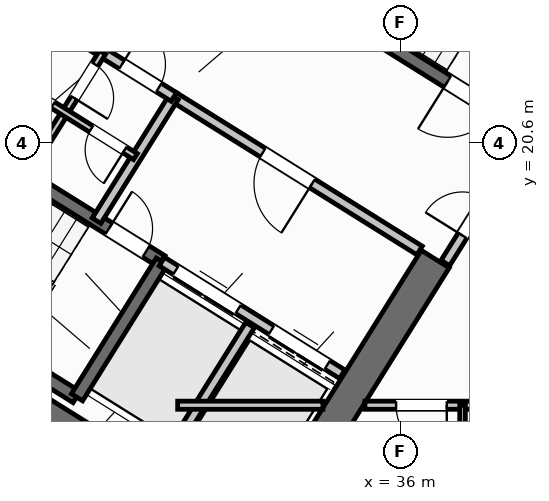
"""IFC4 building model, lengths in metres.
Left out: names, types, materials, properties, quantities, classifications, styles, units other than length and angle.
Written with IfcOpenShell. Run it as: python <this file> out.ifc"""

import sys

from ifc_helpers import new_model, si_unit, direction, frame, frame_2d, origin, place, context, subcontext, project, spatial, rectangle, extrude, source, transform, mapped, element, fill, save


model = new_model("IFC4")
c1 = context("Model", 3, precision=1e-05, world=origin(), true_north=direction((0.0, 1.0)))
c2 = subcontext(c1, "Body", "Model", "MODEL_VIEW")
j1 = project(units=[si_unit("LENGTHUNIT", "METRE"), si_unit("PLANEANGLEUNIT", "RADIAN")], contexts=[c1])
p1 = place(None, origin())
s1 = spatial("IfcSite", under=j1, at=p1, CompositionType="ELEMENT")
p2 = place(p1, origin())
s2 = spatial("IfcBuilding", under=s1, at=p2, CompositionType="ELEMENT")
p3 = place(p2, frame((0.0, 0.0, 93.6)))
s3 = spatial("IfcBuildingStorey", under=s2, at=p3, CompositionType="ELEMENT", Elevation=93.6)
p4 = place(p3, frame((33.409, 12.45, 0.0), z_axis=(0.0, 0.0, 1.0), x_axis=(-0.848051132073, 0.529914405721, 0.0)))
e1 = element("IfcWall", 1, at=p4, inside=s3, PredefinedType="SHEAR", context=c2, shape_type="SweptSolid", body=[
    extrude(rectangle(XDim=13.24, YDim=0.65, at=frame_2d((6.62, 0.0))), origin(), (0.0, 0.0, 1.0), 3.35),
])
p5 = place(p3, frame((36.683, 18.304, 0.0), z_axis=(0.0, 0.0, 1.0), x_axis=(-0.529899109053, -0.848060690178, 0.0)))
e2 = element("IfcWall", 2, at=p5, inside=s3, PredefinedType="SHEAR", context=c2, shape_type="SweptSolid", body=[
    extrude(rectangle(XDim=6.375, YDim=0.65, at=frame_2d((3.188, 0.0))), origin(), (0.0, 0.0, 1.0), 3.35),
])
p6 = place(p3, frame((31.76, 12.183, 0.0), z_axis=(0.0, 0.0, 1.0), x_axis=(-0.848047074256, 0.529920899612, 0.0)))
e3 = element("IfcWall", 3, at=p6, inside=s3, PredefinedType="STANDARD", context=c2, shape_type="SweptSolid", body=[
    extrude(rectangle(XDim=30.652, YDim=0.32, at=frame_2d((15.326, 0.0))), origin(), (0.0, 0.0, 1.0), 3.35),
])
p7 = place(p6, frame((15.153, 0.0, 0.0)))
e4 = element("IfcOpeningElement", 4, at=p7, cuts=e3, PredefinedType="OPENING", context=c2, shape_type="SweptSolid", body=[
    extrude(rectangle(XDim=1.2, YDim=2.15, at=frame_2d((0.6, 1.075))), frame((0.0, 0.17, 0.0), z_axis=(0.0, -1.0, 0.0), x_axis=(1.0, 0.0, 0.0)), (0.0, 0.0, 1.0), 0.34),
])
p8 = place(p6, frame((2.002, 0.0, 0.8)))
e5 = element("IfcOpeningElement", 5, at=p8, cuts=e3, PredefinedType="OPENING", context=c2, shape_type="SweptSolid", body=[
    extrude(rectangle(XDim=2.1, YDim=1.55, at=frame_2d((1.05, 0.775))), frame((0.0, 0.17, 0.0), z_axis=(0.0, -1.0, 0.0), x_axis=(1.0, 0.0, 0.0)), (0.0, 0.0, 1.0), 0.34),
])
p9 = place(p6, frame((7.206, 0.0, 0.8)))
e6 = element("IfcOpeningElement", 6, at=p9, cuts=e3, PredefinedType="OPENING", context=c2, shape_type="SweptSolid", body=[
    extrude(rectangle(XDim=2.1, YDim=1.55, at=frame_2d((1.05, 0.775))), frame((0.0, 0.17, 0.0), z_axis=(0.0, -1.0, 0.0), x_axis=(1.0, 0.0, 0.0)), (0.0, 0.0, 1.0), 0.34),
])
p10 = place(p6, frame((12.648, 0.0, 1.0)))
e7 = element("IfcOpeningElement", 7, at=p10, cuts=e3, PredefinedType="OPENING", context=c2, shape_type="SweptSolid", body=[
    extrude(rectangle(XDim=0.9, YDim=1.25, at=frame_2d((0.45, 0.625))), frame((0.0, 0.17, 0.0), z_axis=(0.0, -1.0, 0.0), x_axis=(1.0, 0.0, 0.0)), (0.0, 0.0, 1.0), 0.34),
])
p11 = place(p6, frame((27.974, 0.0, 0.95)))
e8 = element("IfcOpeningElement", 8, at=p11, cuts=e3, PredefinedType="OPENING", context=c2, shape_type="SweptSolid", body=[
    extrude(rectangle(XDim=1.2, YDim=1.4, at=frame_2d((0.6, 0.7))), frame((0.0, 0.17, 0.0), z_axis=(0.0, -1.0, 0.0), x_axis=(1.0, 0.0, 0.0)), (0.0, 0.0, 1.0), 0.34),
])
p12 = place(p6, frame((18.347, 0.0, 1.0)))
e9 = element("IfcOpeningElement", 9, at=p12, cuts=e3, PredefinedType="OPENING", context=c2, shape_type="SweptSolid", body=[
    extrude(rectangle(XDim=0.9, YDim=1.25, at=frame_2d((0.45, 0.625))), frame((0.0, 0.17, 0.0), z_axis=(0.0, -1.0, 0.0), x_axis=(1.0, 0.0, 0.0)), (0.0, 0.0, 1.0), 0.34),
])
p13 = place(p6, frame((20.931, 0.0, 1.0)))
e10 = element("IfcOpeningElement", 10, at=p13, cuts=e3, PredefinedType="OPENING", context=c2, shape_type="SweptSolid", body=[
    extrude(rectangle(XDim=0.65, YDim=1.15, at=frame_2d((0.325, 0.575))), frame((0.0, 0.17, 0.0), z_axis=(0.0, -1.0, 0.0), x_axis=(1.0, 0.0, 0.0)), (0.0, 0.0, 1.0), 0.34),
])
p14 = place(p6, frame((22.938, 0.0, 1.0)))
e11 = element("IfcOpeningElement", 11, at=p14, cuts=e3, PredefinedType="OPENING", context=c2, shape_type="SweptSolid", body=[
    extrude(rectangle(XDim=0.9, YDim=1.25, at=frame_2d((0.45, 0.625))), frame((0.0, 0.17, 0.0), z_axis=(0.0, -1.0, 0.0), x_axis=(1.0, 0.0, 0.0)), (0.0, 0.0, 1.0), 0.34),
])
p15 = place(p6, frame((25.069, 0.0, 1.0)))
e12 = element("IfcOpeningElement", 12, at=p15, cuts=e3, PredefinedType="OPENING", context=c2, shape_type="SweptSolid", body=[
    extrude(rectangle(XDim=0.9, YDim=1.25, at=frame_2d((0.45, 0.625))), frame((0.0, 0.17, 0.0), z_axis=(0.0, -1.0, 0.0), x_axis=(1.0, 0.0, 0.0)), (0.0, 0.0, 1.0), 0.34),
])
p16 = place(p3, frame((29.605, 15.581, 0.0), z_axis=(0.0, 0.0, 1.0), x_axis=(-0.848036911448, 0.529937163087, 0.0)))
e13 = element("IfcWall", 13, at=p16, inside=s3, PredefinedType="SHEAR", context=c2, shape_type="SweptSolid", body=[
    extrude(rectangle(XDim=7.46, YDim=0.26, at=frame_2d((3.73, 0.0))), origin(), (0.0, 0.0, 1.0), 3.35),
])
p17 = place(p3, frame((31.28, 18.261, 0.0), z_axis=(0.0, 0.0, 1.0), x_axis=(-0.848051618787, 0.529913626805, 0.0)))
e14 = element("IfcWall", 14, at=p17, inside=s3, PredefinedType="SHEAR", context=c2, shape_type="SweptSolid", body=[
    extrude(rectangle(XDim=7.46, YDim=0.26, at=frame_2d((3.73, 0.0))), origin(), (0.0, 0.0, 1.0), 3.35),
])
p18 = place(p17, frame((0.36, 0.0, 0.0)))
e15 = element("IfcOpeningElement", 15, at=p18, cuts=e14, PredefinedType="OPENING", context=c2, shape_type="SweptSolid", body=[
    extrude(rectangle(XDim=0.86, YDim=2.05, at=frame_2d((0.43, 1.025))), frame((0.0, 0.14, 0.0), z_axis=(0.0, -1.0, 0.0), x_axis=(1.0, 0.0, 0.0)), (0.0, 0.0, 1.0), 0.28),
])
p19 = place(p3, frame((31.288, 18.256, 0.0), z_axis=(0.0, 0.0, 1.0), x_axis=(-0.529943379326, -0.848033026897, 0.0)))
e16 = element("IfcWall", 16, at=p19, inside=s3, PredefinedType="SHEAR", context=c2, shape_type="SweptSolid", body=[
    extrude(rectangle(XDim=3.16, YDim=0.26, at=frame_2d((1.58, 0.0))), origin(), (0.0, 0.0, 1.0), 3.35),
])
p20 = place(p3, frame((38.046, 21.108, 0.0), z_axis=(0.0, 0.0, 1.0), x_axis=(-0.848054434086, 0.529909121291, 0.0)))
e17 = element("IfcWall", 17, at=p20, inside=s3, PredefinedType="SHEAR", context=c2, shape_type="SweptSolid", body=[
    extrude(rectangle(XDim=7.33, YDim=0.26, at=frame_2d((3.665, 0.0))), origin(), (0.0, 0.0, 1.0), 3.35),
])
p21 = place(p20, frame((0.22, 0.0, 0.0)))
e18 = element("IfcOpeningElement", 18, at=p21, cuts=e17, PredefinedType="OPENING", context=c2, shape_type="SweptSolid", body=[
    extrude(rectangle(XDim=1.1, YDim=2.1, at=frame_2d((0.55, 1.05))), frame((0.0, 0.14, 0.0), z_axis=(0.0, -1.0, 0.0), x_axis=(1.0, 0.0, 0.0)), (0.0, 0.0, 1.0), 0.28),
])
p22 = place(p3, frame((34.848, 16.031, 0.0), z_axis=(0.0, 0.0, 1.0), x_axis=(-0.848044042236, 0.529925751807, 0.0)))
e19 = element("IfcWall", 19, at=p22, inside=s3, PredefinedType="STANDARD", context=c2, shape_type="SweptSolid", body=[
    extrude(rectangle(XDim=4.198, YDim=0.2, at=frame_2d((2.099, 0.0))), origin(), (0.0, 0.0, 1.0), 3.34),
])
p23 = place(p22, frame((0.348, 0.0, 0.0)))
e20 = element("IfcOpeningElement", 20, at=p23, cuts=e19, PredefinedType="OPENING", context=c2, shape_type="SweptSolid", body=[
    extrude(rectangle(XDim=1.3, YDim=2.2, at=frame_2d((0.65, 1.1))), frame((0.0, 0.11, 0.0), z_axis=(0.0, -1.0, 0.0), x_axis=(1.0, 0.0, 0.0)), (0.0, 0.0, 1.0), 0.22),
])
p24 = place(p22, frame((2.423, 0.0, 0.0)))
e21 = element("IfcOpeningElement", 21, at=p24, cuts=e19, PredefinedType="OPENING", context=c2, shape_type="SweptSolid", body=[
    extrude(rectangle(XDim=1.45, YDim=2.25, at=frame_2d((0.725, 1.125))), frame((0.0, 0.11, 0.0), z_axis=(0.0, -1.0, 0.0), x_axis=(1.0, 0.0, 0.0)), (0.0, 0.0, 1.0), 0.22),
])
p25 = place(p3, frame((36.374, 18.474, 0.0), z_axis=(0.0, 0.0, 1.0), x_axis=(-0.848051071577, 0.529914502535, 0.0)))
e22 = element("IfcWall", 22, at=p25, inside=s3, PredefinedType="STANDARD", context=c2, shape_type="SweptSolid", body=[
    extrude(rectangle(XDim=5.718, YDim=0.2, at=frame_2d((2.859, 0.0))), origin(), (0.0, 0.0, 1.0), 3.34),
])
p26 = place(p25, frame((2.498, 0.0, 0.0)))
e23 = element("IfcOpeningElement", 23, at=p26, cuts=e22, PredefinedType="OPENING", context=c2, shape_type="SweptSolid", body=[
    extrude(rectangle(XDim=1.15, YDim=2.1, at=frame_2d((0.575, 1.05))), frame((0.0, 0.11, 0.0), z_axis=(0.0, -1.0, 0.0), x_axis=(1.0, 0.0, 0.0)), (0.0, 0.0, 1.0), 0.22),
])
p27 = place(p3, frame((33.029, 17.003, 0.0), z_axis=(0.0, 0.0, 1.0), x_axis=(-0.529916267533, -0.848049968695, 0.0)))
e24 = element("IfcWall", 24, at=p27, inside=s3, PredefinedType="STANDARD", context=c2, shape_type="SweptSolid", body=[
    extrude(rectangle(XDim=2.92, YDim=0.2, at=frame_2d((1.46, 0.0))), origin(), (0.0, 0.0, 1.0), 3.34),
])
p28 = place(p3, frame((31.525, 21.504, 0.0), z_axis=(0.0, 0.0, 1.0), x_axis=(-0.529907497854, -0.848055448493, 0.0)))
e25 = element("IfcWall", 25, at=p28, inside=s3, PredefinedType="STANDARD", context=c2, shape_type="SweptSolid", body=[
    extrude(rectangle(XDim=2.88, YDim=0.2, at=frame_2d((1.44, 0.0))), origin(), (0.0, 0.0, 1.0), 3.34),
])
p29 = place(p3, frame((31.525, 21.504, 0.0), z_axis=(0.0, 0.0, 1.0), x_axis=(-0.848044998614, 0.529924221305, 0.0)))
e26 = element("IfcWall", 26, at=p29, inside=s3, PredefinedType="STANDARD", context=c2, shape_type="SweptSolid", body=[
    extrude(rectangle(XDim=6.168, YDim=0.2, at=frame_2d((3.084, 0.0))), origin(), (0.0, 0.0, 1.0), 3.34),
])
p30 = place(p29, frame((4.4, 0.0, 0.0)))
e27 = element("IfcOpeningElement", 27, at=p30, cuts=e26, PredefinedType="OPENING", context=c2, shape_type="SweptSolid", body=[
    extrude(rectangle(XDim=0.86, YDim=2.05, at=frame_2d((0.43, 1.025))), frame((0.0, 0.11, 0.0), z_axis=(0.0, -1.0, 0.0), x_axis=(1.0, 0.0, 0.0)), (0.0, 0.0, 1.0), 0.22),
])
p31 = place(p29, frame((0.35, 0.0, 0.0)))
e28 = element("IfcOpeningElement", 28, at=p31, cuts=e26, PredefinedType="OPENING", context=c2, shape_type="SweptSolid", body=[
    extrude(rectangle(XDim=0.86, YDim=2.05, at=frame_2d((0.43, 1.025))), frame((0.0, 0.11, 0.0), z_axis=(0.0, -1.0, 0.0), x_axis=(1.0, 0.0, 0.0)), (0.0, 0.0, 1.0), 0.22),
])
p32 = place(p3, frame((30.117, 22.384, 0.0), z_axis=(0.0, 0.0, 1.0), x_axis=(-0.529951914384, -0.848027693204, 0.0)))
e29 = element("IfcWall", 29, at=p32, inside=s3, PredefinedType="PLUMBINGWALL", context=c2, shape_type="SweptSolid", body=[
    extrude(rectangle(XDim=1.4, YDim=0.14, at=frame_2d((0.7, 0.0))), origin(), (0.0, 0.0, 1.0), 3.34),
])
p33 = place(p32, frame((0.28, 0.0, 0.0)))
e30 = element("IfcOpeningElement", 30, at=p33, cuts=e29, PredefinedType="OPENING", context=c2, shape_type="SweptSolid", body=[
    extrude(rectangle(XDim=0.78, YDim=2.05, at=frame_2d((0.39, 1.025))), frame((0.0, 0.08, 0.0), z_axis=(0.0, -1.0, 0.0), x_axis=(1.0, 0.0, 0.0)), (0.0, 0.0, 1.0), 0.16),
])
p34 = place(p3, frame((29.375, 21.196, 0.0), z_axis=(0.0, 0.0, 1.0), x_axis=(-0.529865479138, -0.848081702443, 0.0)))
e31 = element("IfcWall", 31, at=p34, inside=s3, PredefinedType="PLUMBINGWALL", context=c2, shape_type="SweptSolid", body=[
    extrude(rectangle(XDim=1.48, YDim=0.14, at=frame_2d((0.74, 0.0))), origin(), (0.0, 0.0, 1.0), 3.34),
])
p35 = place(p3, frame((30.766, 20.327, 0.0), z_axis=(0.0, 0.0, 1.0), x_axis=(-0.848052663127, 0.529911955482, 0.0)))
e32 = element("IfcWall", 32, at=p35, inside=s3, PredefinedType="PLUMBINGWALL", context=c2, shape_type="SweptSolid", body=[
    extrude(rectangle(XDim=3.28, YDim=0.14, at=frame_2d((1.64, 0.0))), origin(), (0.0, 0.0, 1.0), 3.34),
])
p36 = place(p35, frame((0.25, 0.0, 0.0)))
e33 = element("IfcOpeningElement", 33, at=p36, cuts=e32, PredefinedType="OPENING", context=c2, shape_type="SweptSolid", body=[
    extrude(rectangle(XDim=0.78, YDim=2.05, at=frame_2d((0.39, 1.025))), frame((0.0, 0.08, 0.0), z_axis=(0.0, -1.0, 0.0), x_axis=(1.0, 0.0, 0.0)), (0.0, 0.0, 1.0), 0.16),
])
p37 = place(p35, frame((1.92, 0.0, 0.0)))
e34 = element("IfcOpeningElement", 34, at=p37, cuts=e32, PredefinedType="OPENING", context=c2, shape_type="SweptSolid", body=[
    extrude(rectangle(XDim=0.78, YDim=2.05, at=frame_2d((0.39, 1.025))), frame((0.0, 0.08, 0.0), z_axis=(0.0, -1.0, 0.0), x_axis=(1.0, 0.0, 0.0)), (0.0, 0.0, 1.0), 0.16),
])
p38 = place(p3, frame((38.451, 20.737, 0.0), z_axis=(0.0, 0.0, 1.0), x_axis=(-0.529924799939, -0.848044637038, 0.0)))
e35 = element("IfcWall", 35, at=p38, inside=s3, PredefinedType="STANDARD", context=c2, shape_type="SweptSolid", body=[
    extrude(rectangle(XDim=2.96, YDim=0.2, at=frame_2d((1.48, 0.0))), origin(), (0.0, 0.0, 1.0), 3.34),
])
p39 = place(p38, frame((1.46, 0.0, 0.0)))
e36 = element("IfcOpeningElement", 36, at=p39, cuts=e35, PredefinedType="OPENING", context=c2, shape_type="SweptSolid", body=[
    extrude(rectangle(XDim=0.86, YDim=2.05, at=frame_2d((0.43, 1.025))), frame((0.0, 0.11, 0.0), z_axis=(0.0, -1.0, 0.0), x_axis=(1.0, 0.0, 0.0)), (0.0, 0.0, 1.0), 0.22),
])
p40 = place(p3, frame((31.6, 15.42, 0.0), z_axis=(0.0, 0.0, 1.0), x_axis=(1.0, 0.0, 0.0)))
e37 = element("IfcWall", 37, at=p40, inside=s3, PredefinedType="PARTITIONING", context=c2, shape_type="SweptSolid", body=[
    extrude(rectangle(XDim=2.866, YDim=0.16, at=frame_2d((1.433, 0.0))), origin(), (0.0, 0.0, 1.0), 3.34),
])
p41 = place(p3, frame((35.296, 15.42, 0.0), z_axis=(0.0, 0.0, 1.0), x_axis=(1.0, 0.0, 0.0)))
e38 = element("IfcWall", 38, at=p41, inside=s3, PredefinedType="PARTITIONING", context=c2, shape_type="SweptSolid", body=[
    extrude(rectangle(XDim=15.311, YDim=0.16, at=frame_2d((7.655, 0.0))), origin(), (0.0, 0.0, 1.0), 3.34),
])
p42 = place(p41, frame((0.615, 0.0, 0.0)))
e39 = element("IfcOpeningElement", 39, at=p42, cuts=e38, PredefinedType="OPENING", context=c2, shape_type="SweptSolid", body=[
    extrude(rectangle(XDim=1.0, YDim=2.1, at=frame_2d((0.5, 1.05))), frame((0.0, 0.09, 0.0), z_axis=(0.0, -1.0, 0.0), x_axis=(1.0, 0.0, 0.0)), (0.0, 0.0, 1.0), 0.18),
])
p43 = place(p41, frame((9.035, 0.0, 0.0)))
e40 = element("IfcOpeningElement", 40, at=p43, cuts=e38, PredefinedType="OPENING", context=c2, shape_type="SweptSolid", body=[
    extrude(rectangle(XDim=1.0, YDim=2.1, at=frame_2d((0.5, 1.05))), frame((0.0, 0.09, 0.0), z_axis=(0.0, -1.0, 0.0), x_axis=(1.0, 0.0, 0.0)), (0.0, 0.0, 1.0), 0.18),
])
p44 = place(p3, frame((37.222, 1.96, 0.0), z_axis=(0.0, 0.0, 1.0), x_axis=(0.0, 1.0, 0.0)))
e41 = element("IfcWall", 41, at=p44, inside=s3, PredefinedType="PARTITIONING", context=c2, shape_type="SweptSolid", body=[
    extrude(rectangle(XDim=13.46, YDim=0.11, at=frame_2d((6.73, 0.0))), origin(), (0.0, 0.0, 1.0), 3.34),
])
p45 = place(p44, frame((5.2, 0.0, 0.0)))
e42 = element("IfcOpeningElement", 42, at=p45, cuts=e41, PredefinedType="OPENING", context=c2, shape_type="SweptSolid", body=[
    extrude(rectangle(XDim=0.92, YDim=2.08, at=frame_2d((0.46, 1.04))), frame((0.0, 0.065, 0.0), z_axis=(0.0, -1.0, 0.0), x_axis=(1.0, 0.0, 0.0)), (0.0, 0.0, 1.0), 0.13),
])
p46 = place(p44, frame((10.89, 0.0, 0.0)))
e43 = element("IfcOpeningElement", 43, at=p46, cuts=e41, PredefinedType="OPENING", context=c2, shape_type="SweptSolid", body=[
    extrude(rectangle(XDim=0.88, YDim=2.08, at=frame_2d((0.44, 1.04))), frame((0.0, 0.065, 0.0), z_axis=(0.0, -1.0, 0.0), x_axis=(1.0, 0.0, 0.0)), (0.0, 0.0, 1.0), 0.13),
])
m1 = source(origin(), c2, "Body", "SweptSolid", [
    extrude(rectangle(XDim=0.86, YDim=2.05, at=frame_2d((0.43, 1.025))), frame((0.0, 0.025, 0.0), z_axis=(0.0, -1.0, 0.0), x_axis=(1.0, 0.0, 0.0)), (0.0, 0.0, 1.0), 0.05),
])
p47 = place(p18, frame((0.86, 0.0, 0.0), z_axis=(0.0, 0.0, 1.0), x_axis=(-1.0, 0.0, 0.0)))
e44 = element("IfcDoor", 44, at=p47, inside=s3, OperationType="SINGLE_SWING_LEFT", PredefinedType="DOOR", context=c2, shape_type="MappedRepresentation", body=[
    mapped(m1, transform((0.0, 0.0, 0.0), scale=1.0)),
])
fill(e15, e44)
m2 = source(origin(), c2, "Body", "SweptSolid", [
    extrude(rectangle(XDim=1.1, YDim=2.1, at=frame_2d((0.55, 1.05))), frame((0.0, 0.025, 0.0), z_axis=(0.0, -1.0, 0.0), x_axis=(1.0, 0.0, 0.0)), (0.0, 0.0, 1.0), 0.05),
])
p48 = place(p21, origin())
e45 = element("IfcDoor", 45, at=p48, inside=s3, OperationType="SINGLE_SWING_RIGHT", PredefinedType="DOOR", context=c2, shape_type="MappedRepresentation", body=[
    mapped(m2, transform((0.0, 0.0, 0.0), scale=1.0)),
])
fill(e18, e45)
m3 = source(origin(), c2, "Body", "SweptSolid", [
    extrude(rectangle(XDim=1.15, YDim=2.1, at=frame_2d((0.575, 1.05))), frame((0.0, 0.025, 0.0), z_axis=(0.0, -1.0, 0.0), x_axis=(1.0, 0.0, 0.0)), (0.0, 0.0, 1.0), 0.05),
])
p49 = place(p26, origin())
e46 = element("IfcDoor", 46, at=p49, inside=s3, OperationType="SINGLE_SWING_LEFT", PredefinedType="DOOR", context=c2, shape_type="MappedRepresentation", body=[
    mapped(m3, transform((0.0, 0.0, 0.0), scale=1.0)),
])
fill(e23, e46)
m4 = source(origin(), c2, "Body", "SweptSolid", [
    extrude(rectangle(XDim=1.3, YDim=2.2, at=frame_2d((0.65, 1.1))), frame((0.0, 0.025, 0.0), z_axis=(0.0, -1.0, 0.0), x_axis=(1.0, 0.0, 0.0)), (0.0, 0.0, 1.0), 0.05),
])
p50 = place(p23, origin())
e47 = element("IfcDoor", 47, at=p50, inside=s3, OperationType="DOUBLE_DOOR_SLIDING", PredefinedType="DOOR", context=c2, shape_type="MappedRepresentation", body=[
    mapped(m4, transform((0.0, 0.0, 0.0), scale=1.0)),
])
fill(e20, e47)
m5 = source(origin(), c2, "Body", "SweptSolid", [
    extrude(rectangle(XDim=1.45, YDim=2.25, at=frame_2d((0.725, 1.125))), frame((0.0, 0.025, 0.0), z_axis=(0.0, -1.0, 0.0), x_axis=(1.0, 0.0, 0.0)), (0.0, 0.0, 1.0), 0.05),
])
p51 = place(p24, origin())
e48 = element("IfcDoor", 48, at=p51, inside=s3, OperationType="DOUBLE_DOOR_SLIDING", PredefinedType="DOOR", context=c2, shape_type="MappedRepresentation", body=[
    mapped(m5, transform((0.0, 0.0, 0.0), scale=1.0)),
])
fill(e21, e48)
p52 = place(p31, frame((0.86, 0.0, 0.0), z_axis=(0.0, 0.0, 1.0), x_axis=(-1.0, 0.0, 0.0)))
e49 = element("IfcDoor", 49, at=p52, inside=s3, OperationType="SINGLE_SWING_LEFT", PredefinedType="DOOR", context=c2, shape_type="MappedRepresentation", body=[
    mapped(m1, transform((0.0, 0.0, 0.0), scale=1.0)),
])
fill(e28, e49)
m6 = source(origin(), c2, "Body", "SweptSolid", [
    extrude(rectangle(XDim=0.78, YDim=2.05, at=frame_2d((0.39, 1.025))), frame((0.0, 0.025, 0.0), z_axis=(0.0, -1.0, 0.0), x_axis=(1.0, 0.0, 0.0)), (0.0, 0.0, 1.0), 0.05),
])
p53 = place(p33, origin())
e50 = element("IfcDoor", 50, at=p53, inside=s3, OperationType="SINGLE_SWING_RIGHT", PredefinedType="DOOR", context=c2, shape_type="MappedRepresentation", body=[
    mapped(m6, transform((0.0, 0.0, 0.0), scale=1.0)),
])
fill(e30, e50)
p54 = place(p36, origin())
e51 = element("IfcDoor", 51, at=p54, inside=s3, OperationType="SINGLE_SWING_LEFT", PredefinedType="DOOR", context=c2, shape_type="MappedRepresentation", body=[
    mapped(m6, transform((0.0, 0.0, 0.0), scale=1.0)),
])
fill(e33, e51)
p55 = place(p37, origin())
e52 = element("IfcDoor", 52, at=p55, inside=s3, OperationType="SINGLE_SWING_RIGHT", PredefinedType="DOOR", context=c2, shape_type="MappedRepresentation", body=[
    mapped(m6, transform((0.0, 0.0, 0.0), scale=1.0)),
])
fill(e34, e52)
p56 = place(p39, frame((0.86, 0.0, 0.0), z_axis=(0.0, 0.0, 1.0), x_axis=(-1.0, 0.0, 0.0)))
e53 = element("IfcDoor", 53, at=p56, inside=s3, OperationType="SINGLE_SWING_LEFT", PredefinedType="DOOR", context=c2, shape_type="MappedRepresentation", body=[
    mapped(m1, transform((0.0, 0.0, 0.0), scale=1.0)),
])
fill(e36, e53)
m7 = source(origin(), c2, "Body", "SweptSolid", [
    extrude(rectangle(XDim=1.0, YDim=2.1, at=frame_2d((0.5, 1.05))), frame((0.0, 0.025, 0.0), z_axis=(0.0, -1.0, 0.0), x_axis=(1.0, 0.0, 0.0)), (0.0, 0.0, 1.0), 0.05),
])
p57 = place(p42, frame((1.0, 0.0, 0.0), z_axis=(0.0, 0.0, 1.0), x_axis=(-1.0, 0.0, 0.0)))
e54 = element("IfcDoor", 54, at=p57, inside=s3, OperationType="SINGLE_SWING_LEFT", PredefinedType="DOOR", context=c2, shape_type="MappedRepresentation", body=[
    mapped(m7, transform((0.0, 0.0, 0.0), scale=1.0)),
])
fill(e39, e54)
save(model, sys.argv[1])
